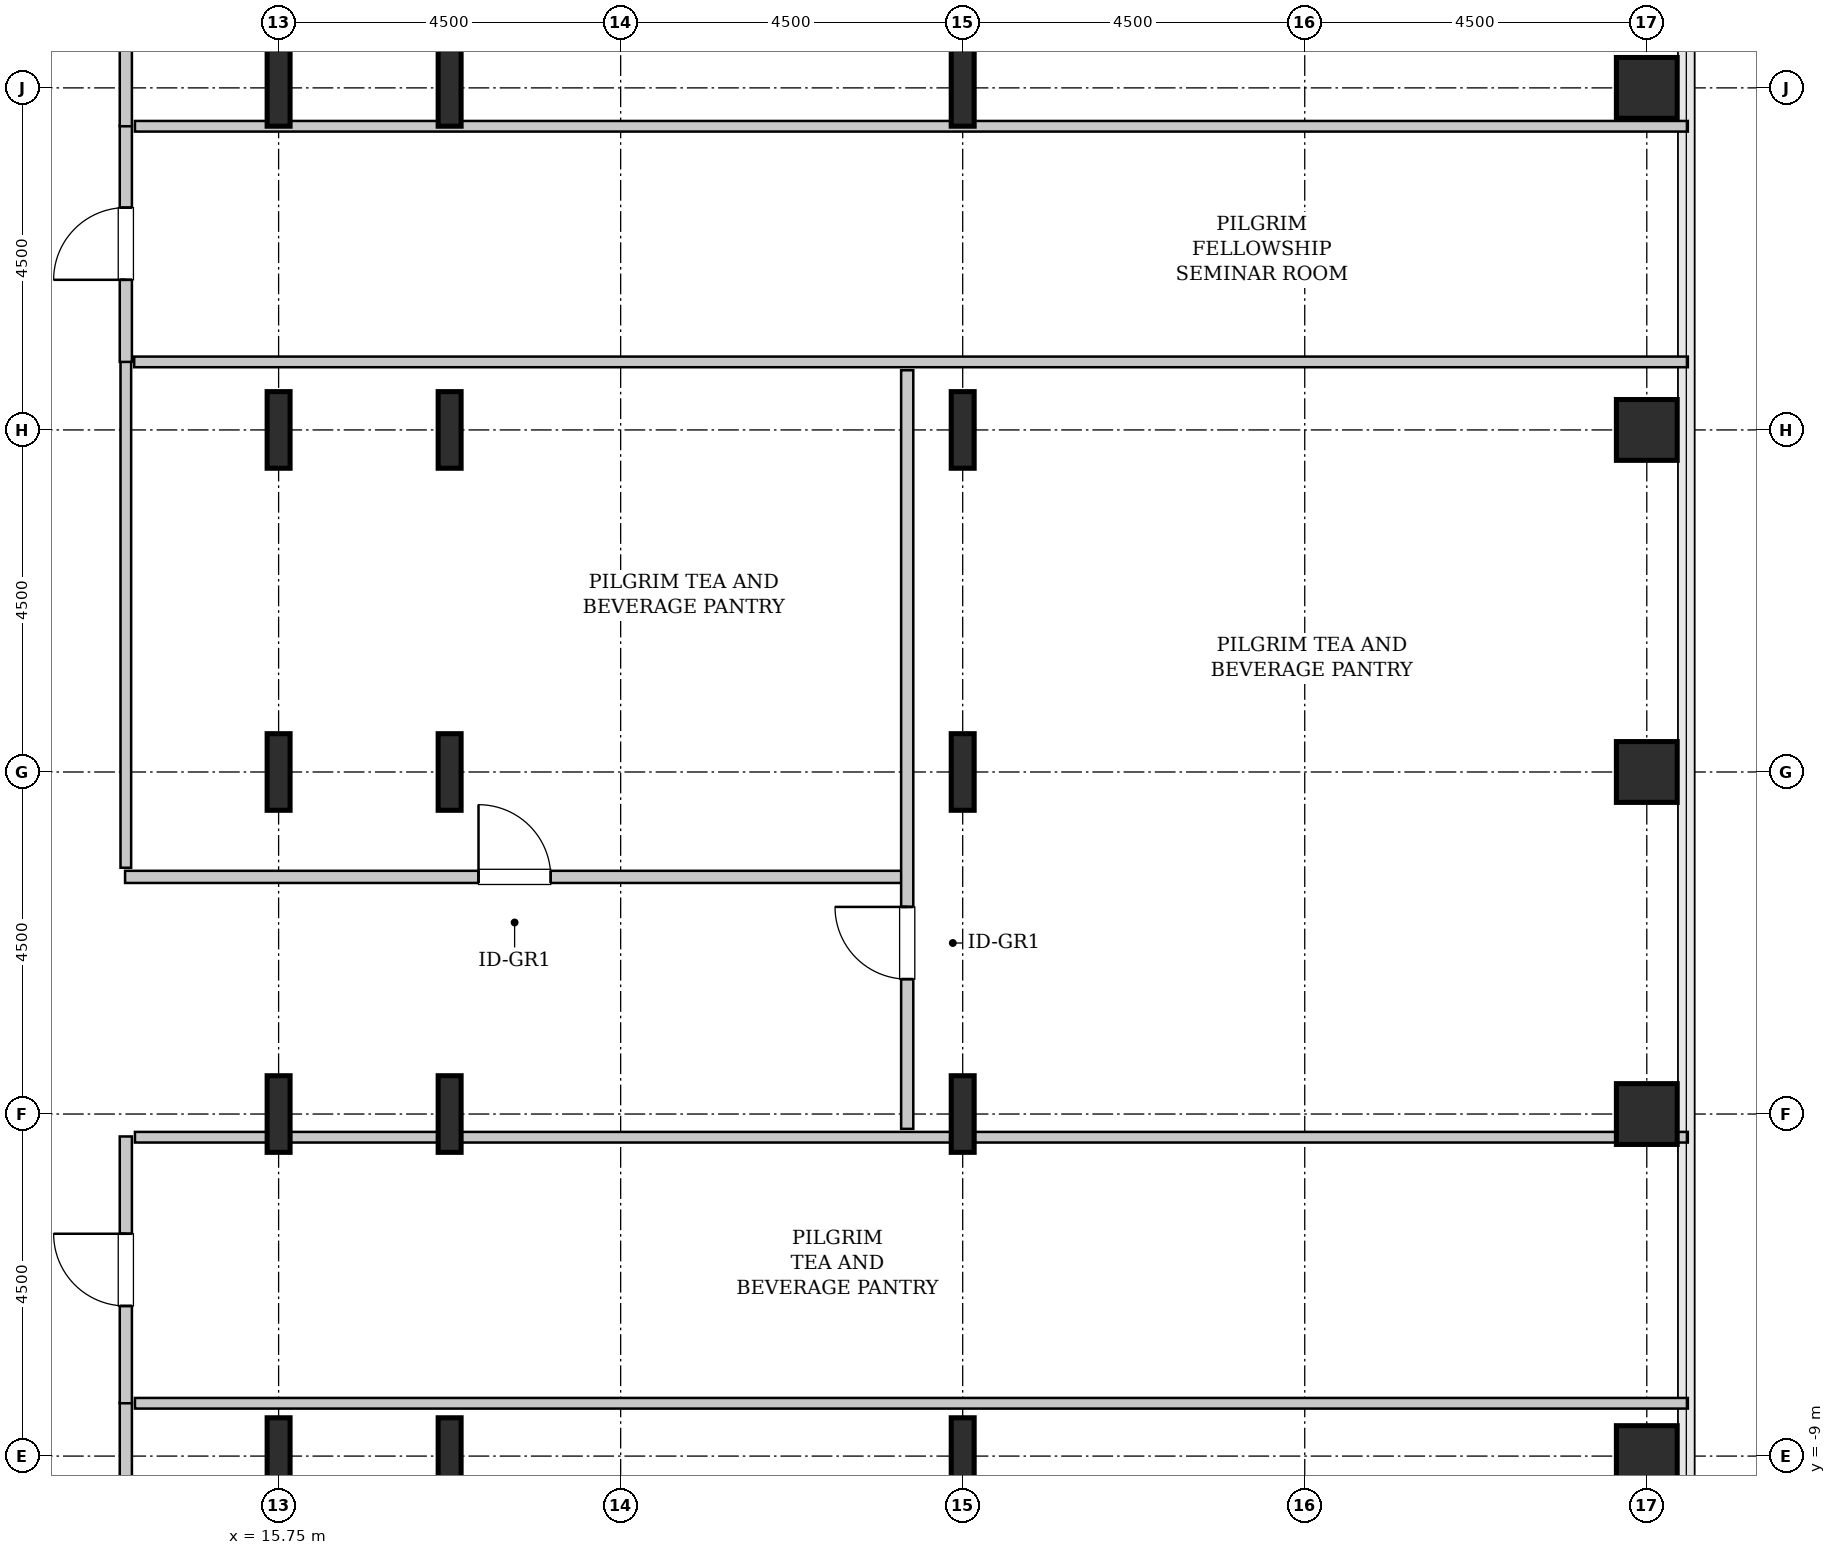
"""IFC4 building model, lengths in metres.
Left out: names, types, materials, properties, quantities, classifications, styles, units other than length and angle.
Written with IfcOpenShell. Run it as: python <this file> out.ifc"""

import sys

from ifc_helpers import new_model, si_unit, direction, frame, frame_2d, origin, origin_2d, place, context, subcontext, project, spatial, rectangle, hollow_rectangle, i_section, extrude, source, transform, mapped, element, fill, save


model = new_model("IFC4")
c1 = context("Model", 3, precision=1e-05, world=origin(), true_north=direction((0.0, 1.0)))
c2 = subcontext(c1, "Body", "Model", "MODEL_VIEW")
j1 = project(units=[si_unit("LENGTHUNIT", "METRE"), si_unit("PLANEANGLEUNIT", "RADIAN")], contexts=[c1])
p1 = place(None, origin())
s1 = spatial("IfcSite", under=j1, at=p1, CompositionType="ELEMENT")
p2 = place(p1, origin())
s2 = spatial("IfcBuilding", under=s1, at=p2, CompositionType="ELEMENT")
p3 = place(p2, frame((0.0, 0.0, 132.6)))
s3 = spatial("IfcBuildingStorey", under=s2, at=p3, CompositionType="ELEMENT", Elevation=132.6)
m1 = source(origin(), c2, "Body", "SweptSolid", [
    extrude(i_section(OverallWidth=0.302, OverallDepth=1.008, WebThickness=0.021, FlangeThickness=0.04, FilletRadius=0.03, at=origin_2d()), origin(), (0.0, 0.0, 1.0), 3.8),
])
for number, where, z_axis, x_axis in (
    (1, (15.75, -9.0, 0.0), (0.0, 0.0, 1.0), (1.0, 0.0, 0.0)),
    (2, (15.75, -4.5, 0.0), (0.0, 0.0, 1.0), (1.0, 0.0, 0.0)),
    (3, (15.75, 0.0, 0.0), (0.0, 0.0, 1.0), (1.0, 0.0, 0.0)),
    (4, (15.75, 4.5, 0.0), (0.0, 0.0, 1.0), (1.0, 0.0, 0.0)),
    (5, (15.75, 9.0, 0.0), (0.0, 0.0, 1.0), (1.0, 0.0, 0.0)),
    (6, (18.0, -9.0, 0.0), (0.0, 0.0, 1.0), (1.0, 0.0, 0.0)),
    (7, (18.0, -4.5, 0.0), (0.0, 0.0, 1.0), (1.0, 0.0, 0.0)),
    (8, (18.0, 0.0, 0.0), (0.0, 0.0, 1.0), (1.0, 0.0, 0.0)),
    (9, (18.0, 4.5, 0.0), (0.0, 0.0, 1.0), (1.0, 0.0, 0.0)),
    (10, (18.0, 9.0, 0.0), (0.0, 0.0, 1.0), (1.0, 0.0, 0.0)),
    (11, (24.75, -9.0, 0.0), (0.0, 0.0, 1.0), (1.0, 0.0, 0.0)),
    (12, (24.75, -4.5, 0.0), (0.0, 0.0, 1.0), (1.0, 0.0, 0.0)),
    (13, (24.75, 0.0, 0.0), (0.0, 0.0, 1.0), (1.0, 0.0, 0.0)),
    (14, (24.75, 4.5, 0.0), (0.0, 0.0, 1.0), (1.0, 0.0, 0.0)),
    (15, (24.75, 9.0, 0.0), (0.0, 0.0, 1.0), (1.0, 0.0, 0.0)),
):
    element("IfcColumn", number, at=place(p3, frame(where, z_axis=z_axis, x_axis=x_axis)), inside=s3, PredefinedType="COLUMN", context=c2, shape_type="MappedRepresentation", body=[
        mapped(m1, transform((0.0, 0.0, 0.0), x_axis=(1.0, 0.0, 0.0), y_axis=(0.0, 1.0, 0.0), z_axis=(0.0, 0.0, 1.0), scale=1.0)),
    ])
m2 = source(origin(), c2, "Body", "SweptSolid", [
    extrude(hollow_rectangle(XDim=0.8, YDim=0.8, WallThickness=0.04, InnerFilletRadius=0.04, OuterFilletRadius=0.08, at=origin_2d()), origin(), (0.0, 0.0, 1.0), 3.8),
])
for number, where, z_axis, x_axis in (
    (16, (33.75, -9.0, 0.0), (0.0, 0.0, 1.0), (1.0, 0.0, 0.0)),
    (17, (33.75, -4.5, 0.0), (0.0, 0.0, 1.0), (1.0, 0.0, 0.0)),
    (18, (33.75, 0.0, 0.0), (0.0, 0.0, 1.0), (1.0, 0.0, 0.0)),
    (19, (33.75, 4.5, 0.0), (0.0, 0.0, 1.0), (1.0, 0.0, 0.0)),
    (20, (33.75, 9.0, 0.0), (0.0, 0.0, 1.0), (1.0, 0.0, 0.0)),
):
    element("IfcColumn", number, at=place(p3, frame(where, z_axis=z_axis, x_axis=x_axis)), inside=s3, PredefinedType="COLUMN", context=c2, shape_type="MappedRepresentation", body=[
        mapped(m2, transform((0.0, 0.0, 0.0), x_axis=(1.0, 0.0, 0.0), y_axis=(0.0, 1.0, 0.0), z_axis=(0.0, 0.0, 1.0), scale=1.0)),
    ])
m3 = source(origin(), c2, "Body", "SweptSolid", [
    extrude(rectangle(XDim=14.745, YDim=0.16, at=frame_2d((7.373, 0.0))), origin(), (0.0, 0.0, 1.0), 3.535),
])
p4 = place(p3, frame((13.74, -23.04, 0.0), z_axis=(0.0, 0.0, 1.0), x_axis=(0.0, 1.0, 0.0)))
e21 = element("IfcWall", 21, at=p4, inside=s3, PredefinedType="PARTITIONING", context=c2, shape_type="MappedRepresentation", body=[
    mapped(m3, transform((0.0, 0.0, 0.0), x_axis=(1.0, 0.0, 0.0), y_axis=(0.0, 1.0, 0.0), z_axis=(0.0, 0.0, 1.0), scale=1.0)),
])
p5 = place(p4, frame((12.663, 0.0, 0.0)))
e22 = element("IfcOpeningElement", 22, at=p5, cuts=e21, PredefinedType="OPENING", context=c2, shape_type="SweptSolid", body=[
    extrude(rectangle(XDim=0.95, YDim=2.1, at=frame_2d((0.475, 1.05))), frame((0.0, 0.09, 0.0), z_axis=(0.0, -1.0, 0.0), x_axis=(1.0, 0.0, 0.0)), (0.0, 0.0, 1.0), 0.18),
])
m4 = source(origin(), c2, "Body", "SweptSolid", [
    extrude(rectangle(XDim=20.43, YDim=0.14, at=frame_2d((10.215, 0.0))), origin(), (0.0, 0.0, 1.0), 3.535),
])
p6 = place(p3, frame((13.86, -8.305, 0.0), z_axis=(0.0, 0.0, 1.0), x_axis=(1.0, 0.0, 0.0)))
e23 = element("IfcWall", 23, at=p6, inside=s3, PredefinedType="PARTITIONING", context=c2, shape_type="MappedRepresentation", body=[
    mapped(m4, transform((0.0, 0.0, 0.0), x_axis=(1.0, 0.0, 0.0), y_axis=(0.0, 1.0, 0.0), z_axis=(0.0, 0.0, 1.0), scale=1.0)),
])
m5 = source(origin(), c2, "Body", "SweptSolid", [
    extrude(rectangle(XDim=3.51, YDim=0.16, at=frame_2d((1.755, 0.0))), origin(), (0.0, 0.0, 1.0), 3.535),
])
p7 = place(p3, frame((13.74, -8.305, 0.0), z_axis=(0.0, 0.0, 1.0), x_axis=(0.0, 1.0, 0.0)))
e24 = element("IfcWall", 24, at=p7, inside=s3, PredefinedType="PARTITIONING", context=c2, shape_type="MappedRepresentation", body=[
    mapped(m5, transform((0.0, 0.0, 0.0), x_axis=(1.0, 0.0, 0.0), y_axis=(0.0, 1.0, 0.0), z_axis=(0.0, 0.0, 1.0), scale=1.0)),
])
p8 = place(p7, frame((1.28, 0.0, 0.0)))
e25 = element("IfcOpeningElement", 25, at=p8, cuts=e24, PredefinedType="OPENING", context=c2, shape_type="SweptSolid", body=[
    extrude(rectangle(XDim=0.95, YDim=2.1, at=frame_2d((0.475, 1.05))), frame((0.0, 0.09, 0.0), z_axis=(0.0, -1.0, 0.0), x_axis=(1.0, 0.0, 0.0)), (0.0, 0.0, 1.0), 0.18),
])
m6 = source(origin(), c2, "Body", "SweptSolid", [
    extrude(rectangle(XDim=20.43, YDim=0.14, at=frame_2d((10.215, 0.0))), origin(), (0.0, 0.0, 1.0), 2.875),
])
p9 = place(p3, frame((13.86, -4.805, 0.0), z_axis=(0.0, 0.0, 1.0), x_axis=(1.0, 0.0, 0.0)))
e26 = element("IfcWall", 26, at=p9, inside=s3, PredefinedType="PARTITIONING", context=c2, shape_type="MappedRepresentation", body=[
    mapped(m6, transform((0.0, 0.0, 0.0), x_axis=(1.0, 0.0, 0.0), y_axis=(0.0, 1.0, 0.0), z_axis=(0.0, 0.0, 1.0), scale=1.0)),
])
m7 = source(origin(), c2, "Body", "SweptSolid", [
    extrude(rectangle(XDim=10.25, YDim=0.16, at=frame_2d((5.125, 0.0))), origin(), (0.0, 0.0, 1.0), 3.535),
])
p10 = place(p3, frame((13.73, -1.38, 0.0), z_axis=(0.0, 0.0, 1.0), x_axis=(1.0, 0.0, 0.0)))
e27 = element("IfcWall", 27, at=p10, inside=s3, PredefinedType="PARTITIONING", context=c2, shape_type="MappedRepresentation", body=[
    mapped(m7, transform((0.0, 0.0, 0.0), x_axis=(1.0, 0.0, 0.0), y_axis=(0.0, 1.0, 0.0), z_axis=(0.0, 0.0, 1.0), scale=1.0)),
])
p11 = place(p10, frame((4.65, 0.0, 0.0)))
e28 = element("IfcOpeningElement", 28, at=p11, cuts=e27, PredefinedType="OPENING", context=c2, shape_type="SweptSolid", body=[
    extrude(rectangle(XDim=0.95, YDim=2.1, at=frame_2d((0.475, 1.05))), frame((0.0, 0.09, 0.0), z_axis=(0.0, -1.0, 0.0), x_axis=(1.0, 0.0, 0.0)), (0.0, 0.0, 1.0), 0.18),
])
m8 = source(origin(), c2, "Body", "SweptSolid", [
    extrude(rectangle(XDim=6.665, YDim=0.14, at=frame_2d((3.333, 0.0))), origin(), (0.0, 0.0, 1.0), 3.535),
])
p12 = place(p3, frame((13.74, -1.26, 0.0), z_axis=(0.0, 0.0, 1.0), x_axis=(0.0, 1.0, 0.0)))
e29 = element("IfcWall", 29, at=p12, inside=s3, PredefinedType="PARTITIONING", context=c2, shape_type="MappedRepresentation", body=[
    mapped(m8, transform((0.0, 0.0, 0.0), x_axis=(1.0, 0.0, 0.0), y_axis=(0.0, 1.0, 0.0), z_axis=(0.0, 0.0, 1.0), scale=1.0)),
])
m9 = source(origin(), c2, "Body", "SweptSolid", [
    extrude(rectangle(XDim=20.44, YDim=0.14, at=frame_2d((10.22, 0.0))), origin(), (0.0, 0.0, 1.0), 3.535),
])
p13 = place(p3, frame((13.85, 5.395, 0.0), z_axis=(0.0, 0.0, 1.0), x_axis=(1.0, 0.0, 0.0)))
e30 = element("IfcWall", 30, at=p13, inside=s3, PredefinedType="PARTITIONING", context=c2, shape_type="MappedRepresentation", body=[
    mapped(m9, transform((0.0, 0.0, 0.0), x_axis=(1.0, 0.0, 0.0), y_axis=(0.0, 1.0, 0.0), z_axis=(0.0, 0.0, 1.0), scale=1.0)),
])
m10 = source(origin(), c2, "Body", "SweptSolid", [
    extrude(rectangle(XDim=9.98, YDim=0.16, at=frame_2d((4.99, 0.0))), origin(), (0.0, 0.0, 1.0), 3.535),
])
p14 = place(p3, frame((24.02, -4.695, 0.0), z_axis=(0.0, 0.0, 1.0), x_axis=(0.0, 1.0, 0.0)))
e31 = element("IfcWall", 31, at=p14, inside=s3, PredefinedType="PARTITIONING", context=c2, shape_type="MappedRepresentation", body=[
    mapped(m10, transform((0.0, 0.0, 0.0), x_axis=(1.0, 0.0, 0.0), y_axis=(0.0, 1.0, 0.0), z_axis=(0.0, 0.0, 1.0), scale=1.0)),
])
p15 = place(p14, frame((1.97, 0.0, 0.0)))
e32 = element("IfcOpeningElement", 32, at=p15, cuts=e31, PredefinedType="OPENING", context=c2, shape_type="SweptSolid", body=[
    extrude(rectangle(XDim=0.95, YDim=2.1, at=frame_2d((0.475, 1.05))), frame((0.0, 0.09, 0.0), z_axis=(0.0, -1.0, 0.0), x_axis=(1.0, 0.0, 0.0)), (0.0, 0.0, 1.0), 0.18),
])
m11 = source(origin(), c2, "Body", "SweptSolid", [
    extrude(rectangle(XDim=3.11, YDim=0.16, at=frame_2d((1.555, 0.0))), origin(), (0.0, 0.0, 1.0), 3.535),
])
p16 = place(p3, frame((13.74, 5.395, 0.0), z_axis=(0.0, 0.0, 1.0), x_axis=(0.0, 1.0, 0.0)))
e33 = element("IfcWall", 33, at=p16, inside=s3, PredefinedType="PARTITIONING", context=c2, shape_type="MappedRepresentation", body=[
    mapped(m11, transform((0.0, 0.0, 0.0), x_axis=(1.0, 0.0, 0.0), y_axis=(0.0, 1.0, 0.0), z_axis=(0.0, 0.0, 1.0), scale=1.0)),
])
p17 = place(p16, frame((1.08, 0.0, 0.0)))
e34 = element("IfcOpeningElement", 34, at=p17, cuts=e33, PredefinedType="OPENING", context=c2, shape_type="SweptSolid", body=[
    extrude(rectangle(XDim=0.95, YDim=2.1, at=frame_2d((0.475, 1.05))), frame((0.0, 0.09, 0.0), z_axis=(0.0, -1.0, 0.0), x_axis=(1.0, 0.0, 0.0)), (0.0, 0.0, 1.0), 0.18),
])
p18 = place(p3, frame((13.86, 8.495, 0.0), z_axis=(0.0, 0.0, 1.0), x_axis=(1.0, 0.0, 0.0)))
e35 = element("IfcWall", 35, at=p18, inside=s3, PredefinedType="PARTITIONING", context=c2, shape_type="MappedRepresentation", body=[
    mapped(m6, transform((0.0, 0.0, 0.0), x_axis=(1.0, 0.0, 0.0), y_axis=(0.0, 1.0, 0.0), z_axis=(0.0, 0.0, 1.0), scale=1.0)),
])
m12 = source(origin(), c2, "Body", "SweptSolid", [
    extrude(rectangle(XDim=14.545, YDim=0.16, at=frame_2d((7.272, 0.0))), origin(), (0.0, 0.0, 1.0), 3.535),
])
p19 = place(p3, frame((13.74, 8.495, 0.0), z_axis=(0.0, 0.0, 1.0), x_axis=(0.0, 1.0, 0.0)))
e36 = element("IfcWall", 36, at=p19, inside=s3, PredefinedType="PARTITIONING", context=c2, shape_type="MappedRepresentation", body=[
    mapped(m12, transform((0.0, 0.0, 0.0), x_axis=(1.0, 0.0, 0.0), y_axis=(0.0, 1.0, 0.0), z_axis=(0.0, 0.0, 1.0), scale=1.0)),
])
p20 = place(p19, frame((1.032, 0.0, 0.0)))
e37 = element("IfcOpeningElement", 37, at=p20, cuts=e36, PredefinedType="OPENING", context=c2, shape_type="SweptSolid", body=[
    extrude(rectangle(XDim=0.95, YDim=2.1, at=frame_2d((0.475, 1.05))), frame((0.0, 0.09, 0.0), z_axis=(0.0, -1.0, 0.0), x_axis=(1.0, 0.0, 0.0)), (0.0, 0.0, 1.0), 0.18),
])
m13 = source(origin(), c2, "Body", "SweptSolid", [
    extrude(rectangle(XDim=0.95, YDim=2.1, at=frame_2d((0.475, 1.05))), frame((0.0, 0.025, 0.0), z_axis=(0.0, -1.0, 0.0), x_axis=(1.0, 0.0, 0.0)), (0.0, 0.0, 1.0), 0.05),
])
p21 = place(p8, origin())
e38 = element("IfcDoor", 38, at=p21, inside=s3, OperationType="SINGLE_SWING_RIGHT", PredefinedType="DOOR", context=c2, shape_type="MappedRepresentation", body=[
    mapped(m13, transform((0.0, 0.0, 0.0), x_axis=(1.0, 0.0, 0.0), y_axis=(0.0, 1.0, 0.0), z_axis=(0.0, 0.0, 1.0), scale=1.0)),
])
fill(e25, e38)
p22 = place(p11, origin())
e39 = element("IfcDoor", 39, at=p22, inside=s3, OperationType="SINGLE_SWING_LEFT", PredefinedType="DOOR", context=c2, shape_type="MappedRepresentation", body=[
    mapped(m13, transform((0.0, 0.0, 0.0), x_axis=(1.0, 0.0, 0.0), y_axis=(0.0, 1.0, 0.0), z_axis=(0.0, 0.0, 1.0), scale=1.0)),
])
fill(e28, e39)
p23 = place(p15, origin())
e40 = element("IfcDoor", 40, at=p23, inside=s3, OperationType="SINGLE_SWING_RIGHT", PredefinedType="DOOR", context=c2, shape_type="MappedRepresentation", body=[
    mapped(m13, transform((0.0, 0.0, 0.0), x_axis=(1.0, 0.0, 0.0), y_axis=(0.0, 1.0, 0.0), z_axis=(0.0, 0.0, 1.0), scale=1.0)),
])
fill(e32, e40)
p24 = place(p17, origin())
e41 = element("IfcDoor", 41, at=p24, inside=s3, OperationType="SINGLE_SWING_LEFT", PredefinedType="DOOR", context=c2, shape_type="MappedRepresentation", body=[
    mapped(m13, transform((0.0, 0.0, 0.0), x_axis=(1.0, 0.0, 0.0), y_axis=(0.0, 1.0, 0.0), z_axis=(0.0, 0.0, 1.0), scale=1.0)),
])
fill(e34, e41)
save(model, sys.argv[1])
